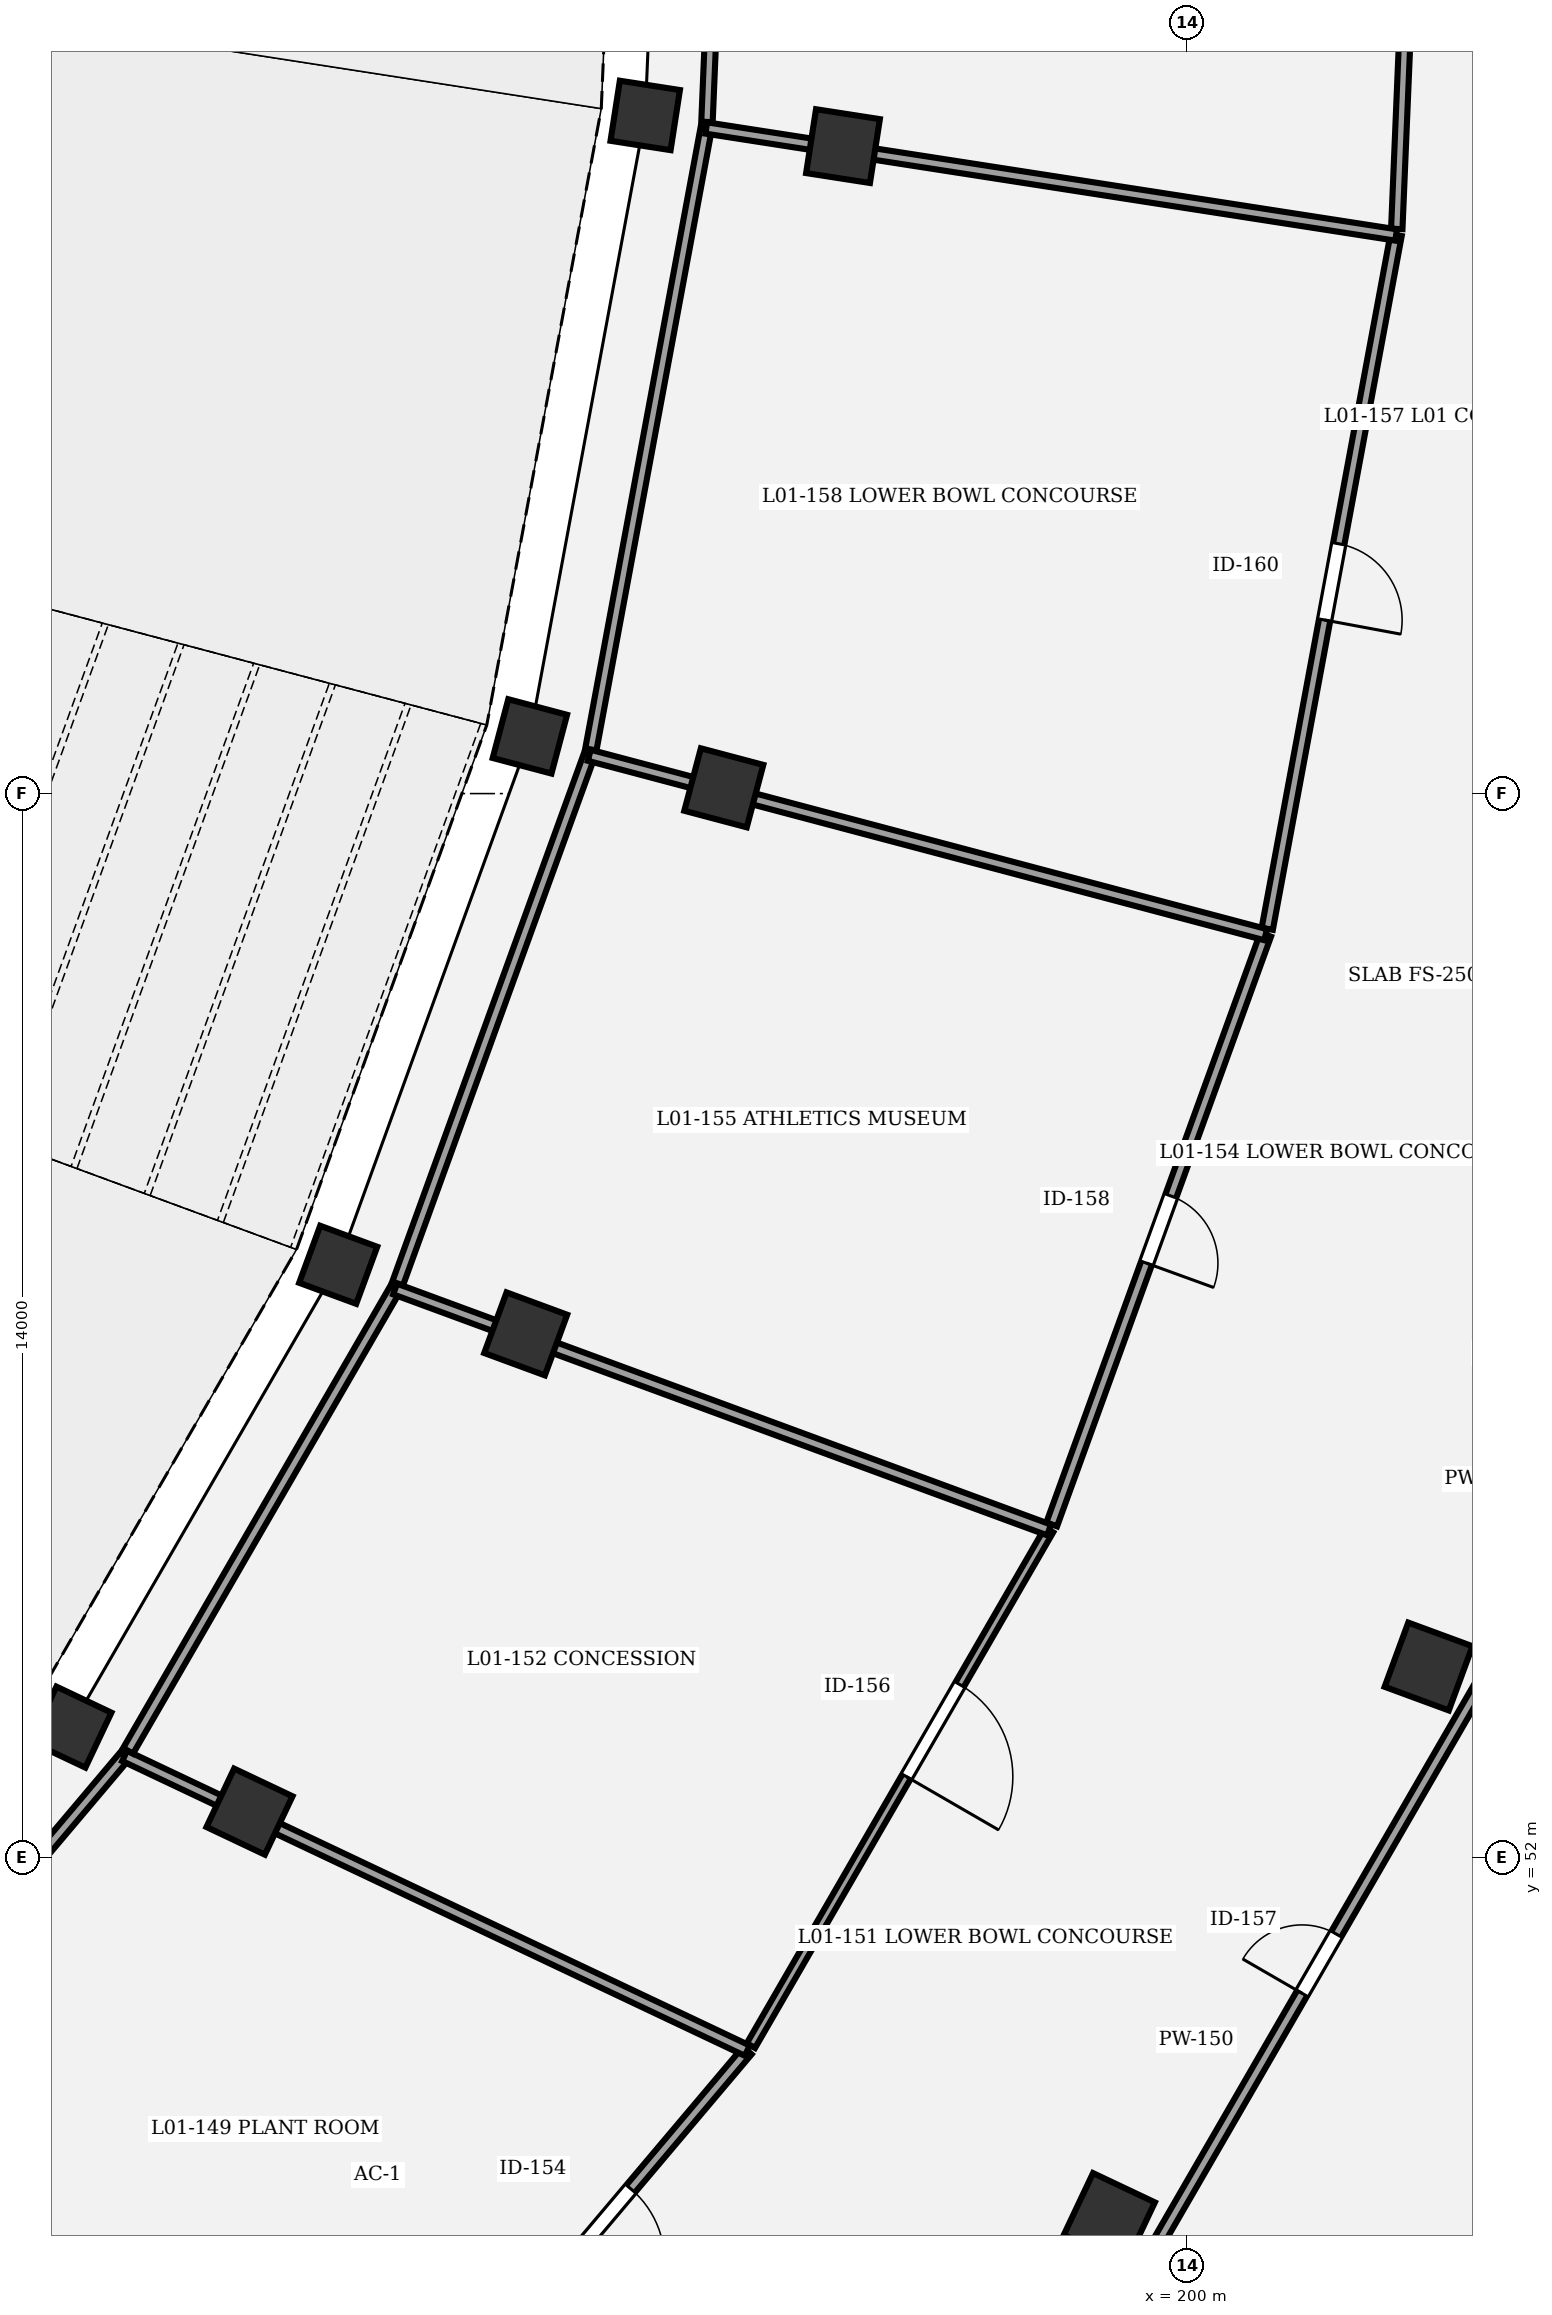
"""IFC4 building model, lengths in metres.
Left out: names, types, materials, properties, quantities, classifications, styles, units other than length and angle.
Written with IfcOpenShell. Run it as: python <this file> out.ifc"""

import sys

from ifc_helpers import new_model, si_unit, direction, frame, frame_2d, origin, origin_2d, place, context, subcontext, project, spatial, rectangle, extrude, element, fill, save


model = new_model("IFC4")
c1 = context("Model", 3, precision=1e-05, world=origin(), true_north=direction((0.0, 1.0)))
c2 = subcontext(c1, "Body", "Model", "MODEL_VIEW")
j1 = project(units=[si_unit("LENGTHUNIT", "METRE"), si_unit("PLANEANGLEUNIT", "RADIAN")], contexts=[c1])
p1 = place(None, origin())
s1 = spatial("IfcSite", under=j1, at=p1, CompositionType="ELEMENT")
p2 = place(p1, origin())
s2 = spatial("IfcBuilding", under=s1, at=p2, CompositionType="ELEMENT")
p3 = place(p2, frame((0.0, 0.0, 5.4)))
s3 = spatial("IfcBuildingStorey", under=s2, at=p3, CompositionType="ELEMENT", Elevation=5.4)
p4 = place(p3, frame((185.313, 53.719, 0.0), z_axis=(0.0, 0.0, 1.0), x_axis=(0.903858661687, -0.4278311813, 0.0)))
e1 = element("IfcColumn", 1, at=p4, inside=s3, PredefinedType="COLUMN", context=c2, shape_type="SweptSolid", body=[
    extrude(rectangle(XDim=0.8, YDim=0.8, at=origin_2d()), origin(), (0.0, 0.0, 1.0), 4.8),
])
p5 = place(p3, frame((187.663, 52.606, 0.0), z_axis=(0.0, 0.0, 1.0), x_axis=(0.903858661687, -0.4278311813, 0.0)))
e2 = element("IfcColumn", 2, at=p5, inside=s3, PredefinedType="COLUMN", context=c2, shape_type="SweptSolid", body=[
    extrude(rectangle(XDim=0.85, YDim=0.85, at=origin_2d()), origin(), (0.0, 0.0, 1.0), 4.8),
])
p6 = place(p3, frame((198.976, 47.252, 0.0), z_axis=(0.0, 0.0, 1.0), x_axis=(0.903858661687, -0.4278311813, 0.0)))
e3 = element("IfcColumn", 3, at=p6, inside=s3, PredefinedType="COLUMN", context=c2, shape_type="SweptSolid", body=[
    extrude(rectangle(XDim=0.9, YDim=0.9, at=origin_2d()), origin(), (0.0, 0.0, 1.0), 4.8),
])
p7 = place(p3, frame((188.83, 59.801, 0.0), z_axis=(0.0, 0.0, 1.0), x_axis=(0.938372433776, -0.34562577382, 0.0)))
e4 = element("IfcColumn", 4, at=p7, inside=s3, PredefinedType="COLUMN", context=c2, shape_type="SweptSolid", body=[
    extrude(rectangle(XDim=0.8, YDim=0.8, at=origin_2d()), origin(), (0.0, 0.0, 1.0), 4.8),
])
p8 = place(p3, frame((191.297, 58.892, 0.0), z_axis=(0.0, 0.0, 1.0), x_axis=(0.938372433776, -0.34562577382, 0.0)))
e5 = element("IfcColumn", 5, at=p8, inside=s3, PredefinedType="COLUMN", context=c2, shape_type="SweptSolid", body=[
    extrude(rectangle(XDim=0.85, YDim=0.85, at=origin_2d()), origin(), (0.0, 0.0, 1.0), 4.8),
])
p9 = place(p3, frame((203.176, 54.516, 0.0), z_axis=(0.0, 0.0, 1.0), x_axis=(0.938372433776, -0.34562577382, 0.0)))
e6 = element("IfcColumn", 6, at=p9, inside=s3, PredefinedType="COLUMN", context=c2, shape_type="SweptSolid", body=[
    extrude(rectangle(XDim=0.9, YDim=0.9, at=origin_2d()), origin(), (0.0, 0.0, 1.0), 4.8),
])
p10 = place(p3, frame((191.352, 66.752, 0.0), z_axis=(0.0, 0.0, 1.0), x_axis=(0.966600102017, -0.256289373133, 0.0)))
e7 = element("IfcColumn", 7, at=p10, inside=s3, PredefinedType="COLUMN", context=c2, shape_type="SweptSolid", body=[
    extrude(rectangle(XDim=0.8, YDim=0.8, at=origin_2d()), origin(), (0.0, 0.0, 1.0), 4.8),
])
p11 = place(p3, frame((193.903, 66.076, 0.0), z_axis=(0.0, 0.0, 1.0), x_axis=(0.966600102017, -0.256289373133, 0.0)))
e8 = element("IfcColumn", 8, at=p11, inside=s3, PredefinedType="COLUMN", context=c2, shape_type="SweptSolid", body=[
    extrude(rectangle(XDim=0.85, YDim=0.85, at=origin_2d()), origin(), (0.0, 0.0, 1.0), 4.8),
])
p12 = place(p3, frame((192.869, 74.922, 0.0), z_axis=(0.0, 0.0, 1.0), x_axis=(0.98817491911, -0.153330783737, 0.0)))
e9 = element("IfcColumn", 9, at=p12, inside=s3, PredefinedType="COLUMN", context=c2, shape_type="SweptSolid", body=[
    extrude(rectangle(XDim=0.8, YDim=0.8, at=origin_2d()), origin(), (0.0, 0.0, 1.0), 4.8),
])
p13 = place(p3, frame((195.471, 74.518, 0.0), z_axis=(0.0, 0.0, 1.0), x_axis=(0.98817491911, -0.153330783737, 0.0)))
e10 = element("IfcColumn", 10, at=p13, inside=s3, PredefinedType="COLUMN", context=c2, shape_type="SweptSolid", body=[
    extrude(rectangle(XDim=0.85, YDim=0.85, at=origin_2d()), origin(), (0.0, 0.0, 1.0), 4.8),
])
p14 = place(p3, frame((194.212, 49.462, 0.0), z_axis=(0.0, 0.0, 1.0), x_axis=(-0.645180817826, -0.764029915847, 0.0)))
e11 = element("IfcWall", 11, at=p14, inside=s3, PredefinedType="PARTITIONING", context=c2, shape_type="SweptSolid", body=[
    extrude(rectangle(XDim=7.779, YDim=0.15, at=frame_2d((3.89, 0.0))), origin(), (0.0, 0.0, 1.0), 3.55),
])
p15 = place(p14, frame((2.378, 0.0, 0.0)))
e12 = element("IfcOpeningElement", 12, at=p15, cuts=e11, PredefinedType="OPENING", context=c2, shape_type="SweptSolid", body=[
    extrude(rectangle(XDim=1.26, YDim=2.1, at=frame_2d((0.63, 1.05))), frame((0.0, 0.085, 0.0), z_axis=(0.0, -1.0, 0.0), x_axis=(1.0, 0.0, 0.0)), (0.0, 0.0, 1.0), 0.17),
])
p16 = place(p3, frame((198.183, 56.312, 0.0), z_axis=(0.0, 0.0, 1.0), x_axis=(-0.500584301803, -0.865687794063, 0.0)))
e13 = element("IfcWall", 13, at=p16, inside=s3, PredefinedType="PARTITIONING", context=c2, shape_type="SweptSolid", body=[
    extrude(rectangle(XDim=7.837, YDim=0.125, at=frame_2d((3.918, 0.0))), origin(), (0.0, 0.0, 1.0), 3.55),
])
p17 = place(p16, frame((2.349, 0.0, 0.0)))
e14 = element("IfcOpeningElement", 14, at=p17, cuts=e13, PredefinedType="OPENING", context=c2, shape_type="SweptSolid", body=[
    extrude(rectangle(XDim=1.4, YDim=2.1, at=frame_2d((0.7, 1.05))), frame((0.0, 0.073, 0.0), z_axis=(0.0, -1.0, 0.0), x_axis=(1.0, 0.0, 0.0)), (0.0, 0.0, 1.0), 0.145),
])
p18 = place(p3, frame((199.641, 46.981, 0.0), z_axis=(0.0, 0.0, 1.0), x_axis=(0.500559280672, 0.865702262059, 0.0)))
e15 = element("IfcWall", 15, at=p18, inside=s3, PredefinedType="PARTITIONING", context=c2, shape_type="SweptSolid", body=[
    extrude(rectangle(XDim=8.375, YDim=0.15, at=frame_2d((4.187, 0.0))), origin(), (0.0, 0.0, 1.0), 3.55),
])
p19 = place(p18, frame((3.737, 0.0, 0.0)))
e16 = element("IfcOpeningElement", 16, at=p19, cuts=e15, PredefinedType="OPENING", context=c2, shape_type="SweptSolid", body=[
    extrude(rectangle(XDim=0.9, YDim=2.2, at=frame_2d((0.45, 1.1))), frame((0.0, 0.085, 0.0), z_axis=(0.0, -1.0, 0.0), x_axis=(1.0, 0.0, 0.0)), (0.0, 0.0, 1.0), 0.17),
])
p20 = place(p3, frame((201.032, 64.144, 0.0), z_axis=(0.0, 0.0, 1.0), x_axis=(-0.341044733968, -0.940047067669, 0.0)))
e17 = element("IfcWall", 17, at=p20, inside=s3, PredefinedType="PARTITIONING", context=c2, shape_type="SweptSolid", body=[
    extrude(rectangle(XDim=8.254, YDim=0.15, at=frame_2d((4.127, 0.0))), origin(), (0.0, 0.0, 1.0), 3.55),
])
p21 = place(p20, frame((3.657, 0.0, 0.0)))
e18 = element("IfcOpeningElement", 18, at=p21, cuts=e17, PredefinedType="OPENING", context=c2, shape_type="SweptSolid", body=[
    extrude(rectangle(XDim=0.94, YDim=2.2, at=frame_2d((0.47, 1.1))), frame((0.0, 0.085, 0.0), z_axis=(0.0, -1.0, 0.0), x_axis=(1.0, 0.0, 0.0)), (0.0, 0.0, 1.0), 0.17),
])
p22 = place(p3, frame((202.749, 73.349, 0.0), z_axis=(0.0, 0.0, 1.0), x_axis=(-0.182600545941, -0.983187184936, 0.0)))
e19 = element("IfcWall", 19, at=p22, inside=s3, PredefinedType="PARTITIONING", context=c2, shape_type="SweptSolid", body=[
    extrude(rectangle(XDim=9.284, YDim=0.15, at=frame_2d((4.642, 0.0))), origin(), (0.0, 0.0, 1.0), 3.55),
])
p23 = place(p22, frame((4.132, 0.0, 0.0)))
e20 = element("IfcOpeningElement", 20, at=p23, cuts=e19, PredefinedType="OPENING", context=c2, shape_type="SweptSolid", body=[
    extrude(rectangle(XDim=1.02, YDim=2.2, at=frame_2d((0.51, 1.1))), frame((0.0, 0.085, 0.0), z_axis=(0.0, -1.0, 0.0), x_axis=(1.0, 0.0, 0.0)), (0.0, 0.0, 1.0), 0.17),
])
p24 = place(p3, frame((203.325, 86.96, 0.0), z_axis=(0.0, 0.0, 1.0), x_axis=(-0.041894479342, -0.999122040894, 0.0)))
e21 = element("IfcWall", 21, at=p24, inside=s3, PredefinedType="PARTITIONING", context=c2, shape_type="SweptSolid", body=[
    extrude(rectangle(XDim=13.543, YDim=0.15, at=frame_2d((6.771, 0.0))), origin(), (0.0, 0.0, 1.0), 3.55),
])
p25 = place(p24, frame((6.242, 0.0, 0.0)))
e22 = element("IfcOpeningElement", 22, at=p25, cuts=e21, PredefinedType="OPENING", context=c2, shape_type="SweptSolid", body=[
    extrude(rectangle(XDim=1.06, YDim=2.2, at=frame_2d((0.53, 1.1))), frame((0.0, 0.085, 0.0), z_axis=(0.0, -1.0, 0.0), x_axis=(1.0, 0.0, 0.0)), (0.0, 0.0, 1.0), 0.17),
])
p26 = place(p3, frame((181.469, 47.958, 0.0), z_axis=(0.0, 0.0, 1.0), x_axis=(0.862510676199, -0.506038865545, 0.0)))
e23 = element("IfcWall", 23, at=p26, inside=s3, PredefinedType="PARTITIONING", context=c2, shape_type="SweptSolid", body=[
    extrude(rectangle(XDim=8.886, YDim=0.15, at=frame_2d((4.443, 0.0))), origin(), (0.0, 0.0, 1.0), 3.55),
])
p27 = place(p3, frame((181.525, 48.017, 0.0), z_axis=(0.0, 0.0, 1.0), x_axis=(0.64516899819, 0.764039896716, 0.0)))
e24 = element("IfcWall", 24, at=p27, inside=s3, PredefinedType="PARTITIONING", context=c2, shape_type="SweptSolid", body=[
    extrude(rectangle(XDim=6.967, YDim=0.15, at=frame_2d((3.483, 0.0))), origin(), (0.0, 0.0, 1.0), 3.55),
])
p28 = place(p3, frame((186.02, 53.34, 0.0), z_axis=(0.0, 0.0, 1.0), x_axis=(0.903857372861, -0.427833904132, 0.0)))
e25 = element("IfcWall", 25, at=p28, inside=s3, PredefinedType="PARTITIONING", context=c2, shape_type="SweptSolid", body=[
    extrude(rectangle(XDim=9.063, YDim=0.15, at=frame_2d((4.532, 0.0))), origin(), (0.0, 0.0, 1.0), 3.55),
])
p29 = place(p3, frame((186.066, 53.406, 0.0), z_axis=(0.0, 0.0, 1.0), x_axis=(0.500549390525, 0.865707980583, 0.0)))
e26 = element("IfcWall", 26, at=p29, inside=s3, PredefinedType="PARTITIONING", context=c2, shape_type="SweptSolid", body=[
    extrude(rectangle(XDim=7.018, YDim=0.15, at=frame_2d((3.509, 0.0))), origin(), (0.0, 0.0, 1.0), 3.55),
])
p30 = place(p3, frame((189.579, 59.482, 0.0), z_axis=(0.0, 0.0, 1.0), x_axis=(0.938348571445, -0.345690553049, 0.0)))
e27 = element("IfcWall", 27, at=p30, inside=s3, PredefinedType="PARTITIONING", context=c2, shape_type="SweptSolid", body=[
    extrude(rectangle(XDim=9.17, YDim=0.15, at=frame_2d((4.585, 0.0))), origin(), (0.0, 0.0, 1.0), 3.55),
])
p31 = place(p3, frame((189.612, 59.555, 0.0), z_axis=(0.0, 0.0, 1.0), x_axis=(0.34104817416, 0.940045819576, 0.0)))
e28 = element("IfcWall", 28, at=p31, inside=s3, PredefinedType="PARTITIONING", context=c2, shape_type="SweptSolid", body=[
    extrude(rectangle(XDim=7.392, YDim=0.15, at=frame_2d((3.696, 0.0))), origin(), (0.0, 0.0, 1.0), 3.55),
])
p32 = place(p3, frame((192.133, 66.504, 0.0), z_axis=(0.0, 0.0, 1.0), x_axis=(0.96658744027, -0.256337122383, 0.0)))
e29 = element("IfcWall", 29, at=p32, inside=s3, PredefinedType="PARTITIONING", context=c2, shape_type="SweptSolid", body=[
    extrude(rectangle(XDim=9.207, YDim=0.15, at=frame_2d((4.604, 0.0))), origin(), (0.0, 0.0, 1.0), 3.55),
])
p33 = place(p3, frame((192.154, 66.581, 0.0), z_axis=(0.0, 0.0, 1.0), x_axis=(0.182614898171, 0.983184519287, 0.0)))
e30 = element("IfcWall", 30, at=p33, inside=s3, PredefinedType="PARTITIONING", context=c2, shape_type="SweptSolid", body=[
    extrude(rectangle(XDim=8.316, YDim=0.15, at=frame_2d((4.158, 0.0))), origin(), (0.0, 0.0, 1.0), 3.55),
])
p34 = place(p3, frame((193.673, 74.757, 0.0), z_axis=(0.0, 0.0, 1.0), x_axis=(0.988184734008, -0.15326751604, 0.0)))
e31 = element("IfcWall", 31, at=p34, inside=s3, PredefinedType="PARTITIONING", context=c2, shape_type="SweptSolid", body=[
    extrude(rectangle(XDim=9.185, YDim=0.15, at=frame_2d((4.592, 0.0))), origin(), (0.0, 0.0, 1.0), 3.55),
])
p35 = place(p3, frame((193.682, 74.836, 0.0), z_axis=(0.0, 0.0, 1.0), x_axis=(0.041909219346, 0.999121422718, 0.0)))
e32 = element("IfcWall", 32, at=p35, inside=s3, PredefinedType="PARTITIONING", context=c2, shape_type="SweptSolid", body=[
    extrude(rectangle(XDim=12.135, YDim=0.15, at=frame_2d((6.067, 0.0))), origin(), (0.0, 0.0, 1.0), 3.55),
])
p36 = place(p15, origin())
e33 = element("IfcDoor", 33, at=p36, inside=s3, OperationType="SINGLE_SWING_RIGHT", PredefinedType="DOOR", context=c2, shape_type="SweptSolid", body=[
    extrude(rectangle(XDim=1.26, YDim=2.1, at=frame_2d((0.63, 1.05))), frame((0.0, 0.025, 0.0), z_axis=(0.0, -1.0, 0.0), x_axis=(1.0, 0.0, 0.0)), (0.0, 0.0, 1.0), 0.05),
])
fill(e12, e33)
p37 = place(p17, origin())
e34 = element("IfcDoor", 34, at=p37, inside=s3, OperationType="SINGLE_SWING_RIGHT", PredefinedType="DOOR", context=c2, shape_type="SweptSolid", body=[
    extrude(rectangle(XDim=1.4, YDim=2.1, at=frame_2d((0.7, 1.05))), frame((0.0, 0.025, 0.0), z_axis=(0.0, -1.0, 0.0), x_axis=(1.0, 0.0, 0.0)), (0.0, 0.0, 1.0), 0.05),
])
fill(e14, e34)
p38 = place(p19, origin())
e35 = element("IfcDoor", 35, at=p38, inside=s3, OperationType="SINGLE_SWING_LEFT", PredefinedType="DOOR", context=c2, shape_type="SweptSolid", body=[
    extrude(rectangle(XDim=0.9, YDim=2.2, at=frame_2d((0.45, 1.1))), frame((0.0, 0.025, 0.0), z_axis=(0.0, -1.0, 0.0), x_axis=(1.0, 0.0, 0.0)), (0.0, 0.0, 1.0), 0.05),
])
fill(e16, e35)
p39 = place(p21, origin())
e36 = element("IfcDoor", 36, at=p39, inside=s3, OperationType="SINGLE_SWING_RIGHT", PredefinedType="DOOR", context=c2, shape_type="SweptSolid", body=[
    extrude(rectangle(XDim=0.94, YDim=2.2, at=frame_2d((0.47, 1.1))), frame((0.0, 0.025, 0.0), z_axis=(0.0, -1.0, 0.0), x_axis=(1.0, 0.0, 0.0)), (0.0, 0.0, 1.0), 0.05),
])
fill(e18, e36)
p40 = place(p23, origin())
e37 = element("IfcDoor", 37, at=p40, inside=s3, OperationType="SINGLE_SWING_RIGHT", PredefinedType="DOOR", context=c2, shape_type="SweptSolid", body=[
    extrude(rectangle(XDim=1.02, YDim=2.2, at=frame_2d((0.51, 1.1))), frame((0.0, 0.025, 0.0), z_axis=(0.0, -1.0, 0.0), x_axis=(1.0, 0.0, 0.0)), (0.0, 0.0, 1.0), 0.05),
])
fill(e20, e37)
save(model, sys.argv[1])
